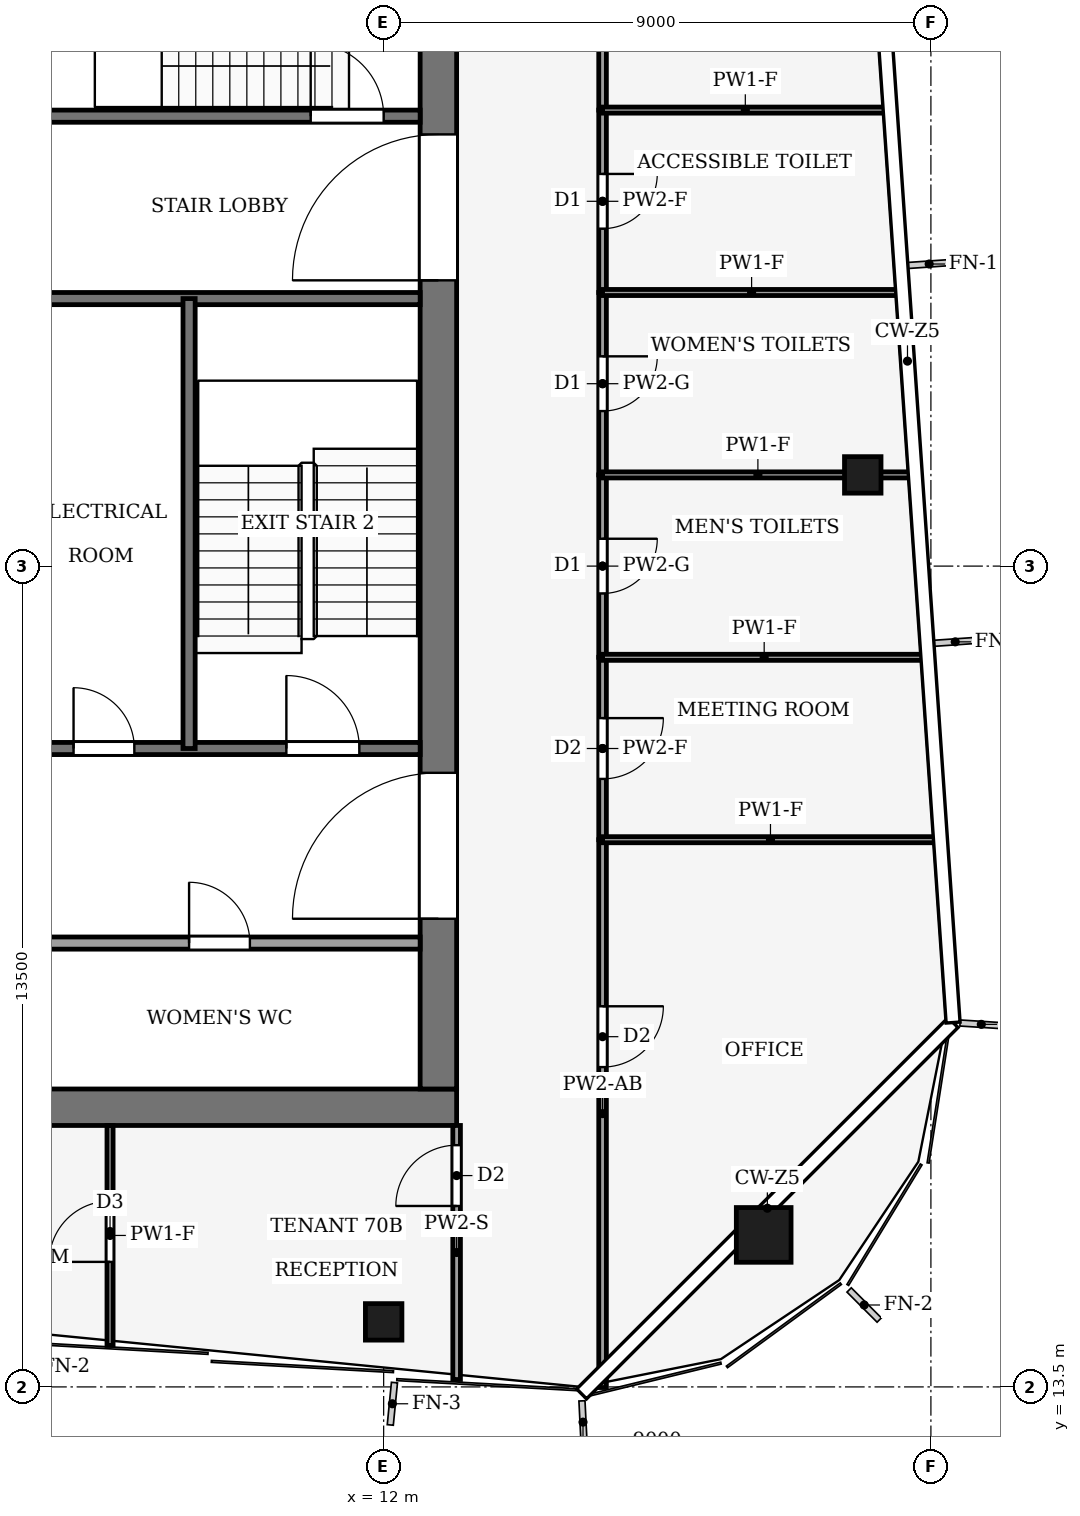
"""IFC4 building model, lengths in metres.
Left out: names, types, materials, properties, quantities, classifications, styles, units other than length and angle.
Written with IfcOpenShell. Run it as: python <this file> out.ifc"""

import sys

from ifc_helpers import new_model, si_unit, direction, frame, frame_2d, origin, origin_2d, place, context, subcontext, project, spatial, rectangle, hollow_rectangle, extrude, element, fill, save


model = new_model("IFC4")
c1 = context("Model", 3, precision=1e-05, world=origin(), true_north=direction((0.0, 1.0)))
c2 = subcontext(c1, "Body", "Model", "MODEL_VIEW")
j1 = project(units=[si_unit("LENGTHUNIT", "METRE"), si_unit("PLANEANGLEUNIT", "RADIAN")], contexts=[c1])
p1 = place(None, origin())
s1 = spatial("IfcSite", under=j1, at=p1, CompositionType="ELEMENT")
p2 = place(p1, origin())
s2 = spatial("IfcBuilding", under=s1, at=p2, CompositionType="ELEMENT")
p3 = place(p2, frame((0.0, 0.0, 306.0)))
s3 = spatial("IfcBuildingStorey", under=s2, at=p3, CompositionType="ELEMENT", Elevation=306.0)
p4 = place(p3, frame((-13.2, 18.1, -0.13), z_axis=(0.0, 0.0, 1.0), x_axis=(1.0, 0.0, 0.0)))
e1 = element("IfcWall", 1, at=p4, inside=s3, PredefinedType="SHEAR", context=c2, shape_type="SweptSolid", body=[
    extrude(rectangle(XDim=26.4, YDim=0.6, at=frame_2d((13.2, 0.0))), origin(), (0.0, 0.0, 1.0), 4.0),
])
p5 = place(p3, frame((12.9, 18.4, -0.13), z_axis=(0.0, 0.0, 1.0), x_axis=(0.0, 1.0, 0.0)))
e2 = element("IfcWall", 2, at=p5, inside=s3, PredefinedType="SHEAR", context=c2, shape_type="SweptSolid", body=[
    extrude(rectangle(XDim=19.2, YDim=0.6, at=frame_2d((9.6, 0.0))), origin(), (0.0, 0.0, 1.0), 4.0),
])
p6 = place(p5, frame((2.8, 0.0, 0.13)))
e3 = element("IfcOpeningElement", 3, at=p6, cuts=e2, PredefinedType="OPENING", context=c2, shape_type="SweptSolid", body=[
    extrude(rectangle(XDim=2.4, YDim=2.4, at=frame_2d((1.2, 1.2))), frame((0.0, 0.31, 0.0), z_axis=(0.0, -1.0, 0.0), x_axis=(1.0, 0.0, 0.0)), (0.0, 0.0, 1.0), 0.62),
])
p7 = place(p5, frame((13.3, 0.0, 0.13)))
e4 = element("IfcOpeningElement", 4, at=p7, cuts=e2, PredefinedType="OPENING", context=c2, shape_type="SweptSolid", body=[
    extrude(rectangle(XDim=2.4, YDim=2.4, at=frame_2d((1.2, 1.2))), frame((0.0, 0.31, 0.0), z_axis=(0.0, -1.0, 0.0), x_axis=(1.0, 0.0, 0.0)), (0.0, 0.0, 1.0), 0.62),
])
p8 = place(p3, frame((18.25, 16.0, 0.0), z_axis=(0.0, 0.0, 1.0), x_axis=(1.0, 0.0, 0.0)))
e5 = element("IfcColumn", 5, at=p8, inside=s3, PredefinedType="COLUMN", context=c2, shape_type="SweptSolid", body=[
    extrude(hollow_rectangle(XDim=0.9, YDim=0.9, WallThickness=0.04, at=origin_2d()), origin(), (0.0, 0.0, 1.0), 4.0),
])
for number, where, z_axis, x_axis in (
    (6, (12.0, 14.57, 0.0), (0.0, 0.0, 1.0), (1.0, 0.0, 0.0)),
    (7, (19.879, 28.5, 0.0), (0.0, 0.0, 1.0), (1.0, 0.0, 0.0)),
):
    element("IfcColumn", number, at=place(p3, frame(where, z_axis=z_axis, x_axis=x_axis)), inside=s3, PredefinedType="COLUMN", context=c2, shape_type="SweptSolid", body=[
        extrude(hollow_rectangle(XDim=0.6, YDim=0.6, WallThickness=0.025, at=origin_2d()), origin(), (0.0, 0.0, 1.0), 4.0),
    ])
p9 = place(p3, frame((6.0, 20.8, 0.0), z_axis=(0.0, 0.0, 1.0), x_axis=(1.0, 0.0, 0.0)))
e8 = element("IfcWall", 8, at=p9, inside=s3, PredefinedType="PARTITIONING", context=c2, shape_type="SweptSolid", body=[
    extrude(rectangle(XDim=6.6, YDim=0.2, at=frame_2d((3.3, 0.0))), origin(), (0.0, 0.0, 1.0), 3.87),
])
p10 = place(p9, frame((2.8, 0.0, 0.0)))
e9 = element("IfcOpeningElement", 9, at=p10, cuts=e8, PredefinedType="OPENING", context=c2, shape_type="SweptSolid", body=[
    extrude(rectangle(XDim=1.0, YDim=2.1, at=frame_2d((0.5, 1.05))), frame((0.0, 0.11, 0.0), z_axis=(0.0, -1.0, 0.0), x_axis=(1.0, 0.0, 0.0)), (0.0, 0.0, 1.0), 0.22),
])
p11 = place(p3, frame((6.0, 24.0, 0.0), z_axis=(0.0, 0.0, 1.0), x_axis=(1.0, 0.0, 0.0)))
e10 = element("IfcWall", 10, at=p11, inside=s3, PredefinedType="PARTITIONING", context=c2, shape_type="SweptSolid", body=[
    extrude(rectangle(XDim=6.6, YDim=0.2, at=frame_2d((3.3, 0.0))), origin(), (0.0, 0.0, 1.0), 3.87),
])
p12 = place(p11, frame((0.9, 0.0, 0.0)))
e11 = element("IfcOpeningElement", 11, at=p12, cuts=e10, PredefinedType="OPENING", context=c2, shape_type="SweptSolid", body=[
    extrude(rectangle(XDim=1.0, YDim=2.1, at=frame_2d((0.5, 1.05))), frame((0.0, 0.11, 0.0), z_axis=(0.0, -1.0, 0.0), x_axis=(1.0, 0.0, 0.0)), (0.0, 0.0, 1.0), 0.22),
])
p13 = place(p11, frame((4.4, 0.0, 0.0)))
e12 = element("IfcOpeningElement", 12, at=p13, cuts=e10, PredefinedType="OPENING", context=c2, shape_type="SweptSolid", body=[
    extrude(rectangle(XDim=1.2, YDim=2.2, at=frame_2d((0.6, 1.1))), frame((0.0, 0.11, 0.0), z_axis=(0.0, -1.0, 0.0), x_axis=(1.0, 0.0, 0.0)), (0.0, 0.0, 1.0), 0.22),
])
p14 = place(p3, frame((6.0, 31.4, 0.0), z_axis=(0.0, 0.0, 1.0), x_axis=(1.0, 0.0, 0.0)))
e13 = element("IfcWall", 13, at=p14, inside=s3, PredefinedType="PARTITIONING", context=c2, shape_type="SweptSolid", body=[
    extrude(rectangle(XDim=6.6, YDim=0.2, at=frame_2d((3.3, 0.0))), origin(), (0.0, 0.0, 1.0), 3.87),
])
p15 = place(p3, frame((6.0, 34.4, 0.0), z_axis=(0.0, 0.0, 1.0), x_axis=(1.0, 0.0, 0.0)))
e14 = element("IfcWall", 14, at=p15, inside=s3, PredefinedType="PARTITIONING", context=c2, shape_type="SweptSolid", body=[
    extrude(rectangle(XDim=6.6, YDim=0.2, at=frame_2d((3.3, 0.0))), origin(), (0.0, 0.0, 1.0), 3.87),
])
p16 = place(p15, frame((4.8, 0.0, 0.0)))
e15 = element("IfcOpeningElement", 15, at=p16, cuts=e14, PredefinedType="OPENING", context=c2, shape_type="SweptSolid", body=[
    extrude(rectangle(XDim=1.2, YDim=2.2, at=frame_2d((0.6, 1.1))), frame((0.0, 0.11, 0.0), z_axis=(0.0, -1.0, 0.0), x_axis=(1.0, 0.0, 0.0)), (0.0, 0.0, 1.0), 0.22),
])
p17 = place(p3, frame((8.8, 24.0, 0.0), z_axis=(0.0, 0.0, 1.0), x_axis=(0.0, 1.0, 0.0)))
e16 = element("IfcWall", 16, at=p17, inside=s3, PredefinedType="PARTITIONING", context=c2, shape_type="SweptSolid", body=[
    extrude(rectangle(XDim=7.4, YDim=0.2, at=frame_2d((3.7, 0.0))), origin(), (0.0, 0.0, 1.0), 3.87),
])
p18 = place(p3, frame((15.6, 22.5, 0.0), z_axis=(0.0, 0.0, 1.0), x_axis=(0.0, -1.0, 0.0)))
e17 = element("IfcWall", 17, at=p18, inside=s3, PredefinedType="PARTITIONING", context=c2, shape_type="SweptSolid", body=[
    extrude(rectangle(XDim=9.01, YDim=0.125, at=frame_2d((4.505, 0.0))), origin(), (0.0, 0.0, 1.0), 2.93),
])
p19 = place(p18, frame((2.74, 0.0, 0.0)))
e18 = element("IfcOpeningElement", 18, at=p19, cuts=e17, PredefinedType="OPENING", context=c2, shape_type="SweptSolid", body=[
    extrude(rectangle(XDim=1.0, YDim=2.1, at=frame_2d((0.5, 1.05))), frame((0.0, 0.073, 0.0), z_axis=(0.0, -1.0, 0.0), x_axis=(1.0, 0.0, 0.0)), (0.0, 0.0, 1.0), 0.145),
])
p20 = place(p3, frame((15.6, 25.5, 0.0), z_axis=(0.0, 0.0, 1.0), x_axis=(0.0, -1.0, 0.0)))
e19 = element("IfcWall", 19, at=p20, inside=s3, PredefinedType="PARTITIONING", context=c2, shape_type="SweptSolid", body=[
    extrude(rectangle(XDim=3.0, YDim=0.125, at=frame_2d((1.5, 0.0))), origin(), (0.0, 0.0, 1.0), 3.54),
])
p21 = place(p20, frame((1.0, 0.0, 0.0)))
e20 = element("IfcOpeningElement", 20, at=p21, cuts=e19, PredefinedType="OPENING", context=c2, shape_type="SweptSolid", body=[
    extrude(rectangle(XDim=1.0, YDim=2.1, at=frame_2d((0.5, 1.05))), frame((0.0, 0.073, 0.0), z_axis=(0.0, -1.0, 0.0), x_axis=(1.0, 0.0, 0.0)), (0.0, 0.0, 1.0), 0.145),
])
p22 = place(p3, frame((15.6, 28.5, 0.0), z_axis=(0.0, 0.0, 1.0), x_axis=(0.0, -1.0, 0.0)))
e21 = element("IfcWall", 21, at=p22, inside=s3, PredefinedType="PARTITIONING", context=c2, shape_type="SweptSolid", body=[
    extrude(rectangle(XDim=3.0, YDim=0.125, at=frame_2d((1.5, 0.0))), origin(), (0.0, 0.0, 1.0), 3.87),
])
p23 = place(p22, frame((1.05, 0.0, 0.0)))
e22 = element("IfcOpeningElement", 22, at=p23, cuts=e21, PredefinedType="OPENING", context=c2, shape_type="SweptSolid", body=[
    extrude(rectangle(XDim=0.9, YDim=2.1, at=frame_2d((0.45, 1.05))), frame((0.0, 0.073, 0.0), z_axis=(0.0, -1.0, 0.0), x_axis=(1.0, 0.0, 0.0)), (0.0, 0.0, 1.0), 0.145),
])
p24 = place(p3, frame((15.6, 31.5, 0.0), z_axis=(0.0, 0.0, 1.0), x_axis=(0.0, -1.0, 0.0)))
e23 = element("IfcWall", 23, at=p24, inside=s3, PredefinedType="PARTITIONING", context=c2, shape_type="SweptSolid", body=[
    extrude(rectangle(XDim=3.0, YDim=0.125, at=frame_2d((1.5, 0.0))), origin(), (0.0, 0.0, 1.0), 3.87),
])
p25 = place(p24, frame((1.05, 0.0, 0.0)))
e24 = element("IfcOpeningElement", 24, at=p25, cuts=e23, PredefinedType="OPENING", context=c2, shape_type="SweptSolid", body=[
    extrude(rectangle(XDim=0.9, YDim=2.1, at=frame_2d((0.45, 1.05))), frame((0.0, 0.073, 0.0), z_axis=(0.0, -1.0, 0.0), x_axis=(1.0, 0.0, 0.0)), (0.0, 0.0, 1.0), 0.145),
])
p26 = place(p3, frame((15.6, 34.5, 0.0), z_axis=(0.0, 0.0, 1.0), x_axis=(0.0, -1.0, 0.0)))
e25 = element("IfcWall", 25, at=p26, inside=s3, PredefinedType="PARTITIONING", context=c2, shape_type="SweptSolid", body=[
    extrude(rectangle(XDim=3.0, YDim=0.125, at=frame_2d((1.5, 0.0))), origin(), (0.0, 0.0, 1.0), 3.54),
])
p27 = place(p26, frame((1.05, 0.0, 0.0)))
e26 = element("IfcOpeningElement", 26, at=p27, cuts=e25, PredefinedType="OPENING", context=c2, shape_type="SweptSolid", body=[
    extrude(rectangle(XDim=0.9, YDim=2.1, at=frame_2d((0.45, 1.05))), frame((0.0, 0.073, 0.0), z_axis=(0.0, -1.0, 0.0), x_axis=(1.0, 0.0, 0.0)), (0.0, 0.0, 1.0), 0.145),
])
p28 = place(p3, frame((15.6, 40.604, 0.0), z_axis=(0.0, 0.0, 1.0), x_axis=(0.0, -1.0, 0.0)))
e27 = element("IfcWall", 27, at=p28, inside=s3, PredefinedType="PARTITIONING", context=c2, shape_type="SweptSolid", body=[
    extrude(rectangle(XDim=6.104, YDim=0.125, at=frame_2d((3.052, 0.0))), origin(), (0.0, 0.0, 1.0), 3.14),
])
p29 = place(p28, frame((2.552, 0.0, 0.0)))
e28 = element("IfcOpeningElement", 28, at=p29, cuts=e27, PredefinedType="OPENING", context=c2, shape_type="SweptSolid", body=[
    extrude(rectangle(XDim=1.0, YDim=2.1, at=frame_2d((0.5, 1.05))), frame((0.0, 0.073, 0.0), z_axis=(0.0, -1.0, 0.0), x_axis=(1.0, 0.0, 0.0)), (0.0, 0.0, 1.0), 0.145),
])
p30 = place(p3, frame((13.2, 13.622, 0.0), z_axis=(0.0, 0.0, 1.0), x_axis=(0.0, 1.0, 0.0)))
e29 = element("IfcWall", 29, at=p30, inside=s3, PredefinedType="PARTITIONING", context=c2, shape_type="SweptSolid", body=[
    extrude(rectangle(XDim=4.178, YDim=0.125, at=frame_2d((2.089, 0.0))), origin(), (0.0, 0.0, 1.0), 3.04),
])
p31 = place(p30, frame((2.854, 0.0, 0.0)))
e30 = element("IfcOpeningElement", 30, at=p31, cuts=e29, PredefinedType="OPENING", context=c2, shape_type="SweptSolid", body=[
    extrude(rectangle(XDim=1.0, YDim=2.1, at=frame_2d((0.5, 1.05))), frame((0.0, 0.073, 0.0), z_axis=(0.0, -1.0, 0.0), x_axis=(1.0, 0.0, 0.0)), (0.0, 0.0, 1.0), 0.145),
])
p32 = place(p3, frame((21.123, 22.5, 0.0), z_axis=(0.0, 0.0, 1.0), x_axis=(-1.0, 0.0, 0.0)))
e31 = element("IfcWall", 31, at=p32, inside=s3, PredefinedType="PARTITIONING", context=c2, shape_type="SweptSolid", body=[
    extrude(rectangle(XDim=5.523, YDim=0.1, at=frame_2d((2.761, 0.0))), origin(), (0.0, 0.0, 1.0), 3.04),
])
p33 = place(p3, frame((20.916, 25.5, 0.0), z_axis=(0.0, 0.0, 1.0), x_axis=(-1.0, 0.0, 0.0)))
e32 = element("IfcWall", 32, at=p33, inside=s3, PredefinedType="PARTITIONING", context=c2, shape_type="SweptSolid", body=[
    extrude(rectangle(XDim=5.316, YDim=0.1, at=frame_2d((2.658, 0.0))), origin(), (0.0, 0.0, 1.0), 3.04),
])
p34 = place(p3, frame((20.709, 28.5, 0.0), z_axis=(0.0, 0.0, 1.0), x_axis=(-1.0, 0.0, 0.0)))
e33 = element("IfcWall", 33, at=p34, inside=s3, PredefinedType="PARTITIONING", context=c2, shape_type="SweptSolid", body=[
    extrude(rectangle(XDim=5.109, YDim=0.1, at=frame_2d((2.555, 0.0))), origin(), (0.0, 0.0, 1.0), 3.04),
])
p35 = place(p3, frame((20.502, 31.5, 0.0), z_axis=(0.0, 0.0, 1.0), x_axis=(-1.0, 0.0, 0.0)))
e34 = element("IfcWall", 34, at=p35, inside=s3, PredefinedType="PARTITIONING", context=c2, shape_type="SweptSolid", body=[
    extrude(rectangle(XDim=4.902, YDim=0.1, at=frame_2d((2.451, 0.0))), origin(), (0.0, 0.0, 1.0), 3.04),
])
p36 = place(p3, frame((20.295, 34.5, 0.0), z_axis=(0.0, 0.0, 1.0), x_axis=(-1.0, 0.0, 0.0)))
e35 = element("IfcWall", 35, at=p36, inside=s3, PredefinedType="PARTITIONING", context=c2, shape_type="SweptSolid", body=[
    extrude(rectangle(XDim=4.695, YDim=0.1, at=frame_2d((2.348, 0.0))), origin(), (0.0, 0.0, 1.0), 3.04),
])
p37 = place(p3, frame((7.5, 14.182, 0.0), z_axis=(0.0, 0.0, 1.0), x_axis=(0.0, 1.0, 0.0)))
e36 = element("IfcWall", 36, at=p37, inside=s3, PredefinedType="PARTITIONING", context=c2, shape_type="SweptSolid", body=[
    extrude(rectangle(XDim=3.618, YDim=0.1, at=frame_2d((1.809, 0.0))), origin(), (0.0, 0.0, 1.0), 3.04),
])
p38 = place(p37, frame((1.374, 0.0, 0.0)))
e37 = element("IfcOpeningElement", 37, at=p38, cuts=e36, PredefinedType="OPENING", context=c2, shape_type="SweptSolid", body=[
    extrude(rectangle(XDim=1.0, YDim=2.1, at=frame_2d((0.5, 1.05))), frame((0.0, 0.06, 0.0), z_axis=(0.0, -1.0, 0.0), x_axis=(1.0, 0.0, 0.0)), (0.0, 0.0, 1.0), 0.12),
])
p39 = place(p10, origin())
e38 = element("IfcDoor", 38, at=p39, inside=s3, OperationType="SINGLE_SWING_RIGHT", PredefinedType="DOOR", context=c2, shape_type="SweptSolid", body=[
    extrude(rectangle(XDim=1.0, YDim=2.1, at=frame_2d((0.5, 1.05))), frame((0.0, 0.025, 0.0), z_axis=(0.0, -1.0, 0.0), x_axis=(1.0, 0.0, 0.0)), (0.0, 0.0, 1.0), 0.05),
])
fill(e9, e38)
p40 = place(p12, origin())
e39 = element("IfcDoor", 39, at=p40, inside=s3, OperationType="SINGLE_SWING_LEFT", PredefinedType="DOOR", context=c2, shape_type="SweptSolid", body=[
    extrude(rectangle(XDim=1.0, YDim=2.1, at=frame_2d((0.5, 1.05))), frame((0.0, 0.025, 0.0), z_axis=(0.0, -1.0, 0.0), x_axis=(1.0, 0.0, 0.0)), (0.0, 0.0, 1.0), 0.05),
])
fill(e11, e39)
p41 = place(p13, origin())
e40 = element("IfcDoor", 40, at=p41, inside=s3, OperationType="SINGLE_SWING_LEFT", PredefinedType="DOOR", context=c2, shape_type="SweptSolid", body=[
    extrude(rectangle(XDim=1.2, YDim=2.2, at=frame_2d((0.6, 1.1))), frame((0.0, 0.025, 0.0), z_axis=(0.0, -1.0, 0.0), x_axis=(1.0, 0.0, 0.0)), (0.0, 0.0, 1.0), 0.05),
])
fill(e12, e40)
p42 = place(p16, origin())
e41 = element("IfcDoor", 41, at=p42, inside=s3, OperationType="SINGLE_SWING_RIGHT", PredefinedType="DOOR", context=c2, shape_type="SweptSolid", body=[
    extrude(rectangle(XDim=1.2, YDim=2.2, at=frame_2d((0.6, 1.1))), frame((0.0, 0.025, 0.0), z_axis=(0.0, -1.0, 0.0), x_axis=(1.0, 0.0, 0.0)), (0.0, 0.0, 1.0), 0.05),
])
fill(e15, e41)
p43 = place(p6, origin())
e42 = element("IfcDoor", 42, at=p43, inside=s3, OperationType="DOUBLE_DOOR_SINGLE_SWING", PredefinedType="DOOR", context=c2, shape_type="SweptSolid", body=[
    extrude(rectangle(XDim=2.4, YDim=2.4, at=frame_2d((1.2, 1.2))), frame((0.0, 0.025, 0.0), z_axis=(0.0, -1.0, 0.0), x_axis=(1.0, 0.0, 0.0)), (0.0, 0.0, 1.0), 0.05),
])
fill(e3, e42)
p44 = place(p7, origin())
e43 = element("IfcDoor", 43, at=p44, inside=s3, OperationType="DOUBLE_DOOR_SINGLE_SWING", PredefinedType="DOOR", context=c2, shape_type="SweptSolid", body=[
    extrude(rectangle(XDim=2.4, YDim=2.4, at=frame_2d((1.2, 1.2))), frame((0.0, 0.025, 0.0), z_axis=(0.0, -1.0, 0.0), x_axis=(1.0, 0.0, 0.0)), (0.0, 0.0, 1.0), 0.05),
])
fill(e4, e43)
p45 = place(p19, origin())
e44 = element("IfcDoor", 44, at=p45, inside=s3, OperationType="SINGLE_SWING_LEFT", PredefinedType="DOOR", context=c2, shape_type="SweptSolid", body=[
    extrude(rectangle(XDim=1.0, YDim=2.1, at=frame_2d((0.5, 1.05))), frame((0.0, 0.025, 0.0), z_axis=(0.0, -1.0, 0.0), x_axis=(1.0, 0.0, 0.0)), (0.0, 0.0, 1.0), 0.05),
])
fill(e18, e44)
p46 = place(p21, origin())
e45 = element("IfcDoor", 45, at=p46, inside=s3, OperationType="SINGLE_SWING_LEFT", PredefinedType="DOOR", context=c2, shape_type="SweptSolid", body=[
    extrude(rectangle(XDim=1.0, YDim=2.1, at=frame_2d((0.5, 1.05))), frame((0.0, 0.025, 0.0), z_axis=(0.0, -1.0, 0.0), x_axis=(1.0, 0.0, 0.0)), (0.0, 0.0, 1.0), 0.05),
])
fill(e20, e45)
p47 = place(p23, origin())
e46 = element("IfcDoor", 46, at=p47, inside=s3, OperationType="SINGLE_SWING_RIGHT", PredefinedType="DOOR", context=c2, shape_type="SweptSolid", body=[
    extrude(rectangle(XDim=0.9, YDim=2.1, at=frame_2d((0.45, 1.05))), frame((0.0, 0.025, 0.0), z_axis=(0.0, -1.0, 0.0), x_axis=(1.0, 0.0, 0.0)), (0.0, 0.0, 1.0), 0.05),
])
fill(e22, e46)
p48 = place(p25, origin())
e47 = element("IfcDoor", 47, at=p48, inside=s3, OperationType="SINGLE_SWING_LEFT", PredefinedType="DOOR", context=c2, shape_type="SweptSolid", body=[
    extrude(rectangle(XDim=0.9, YDim=2.1, at=frame_2d((0.45, 1.05))), frame((0.0, 0.025, 0.0), z_axis=(0.0, -1.0, 0.0), x_axis=(1.0, 0.0, 0.0)), (0.0, 0.0, 1.0), 0.05),
])
fill(e24, e47)
p49 = place(p27, origin())
e48 = element("IfcDoor", 48, at=p49, inside=s3, OperationType="SINGLE_SWING_RIGHT", PredefinedType="DOOR", context=c2, shape_type="SweptSolid", body=[
    extrude(rectangle(XDim=0.9, YDim=2.1, at=frame_2d((0.45, 1.05))), frame((0.0, 0.025, 0.0), z_axis=(0.0, -1.0, 0.0), x_axis=(1.0, 0.0, 0.0)), (0.0, 0.0, 1.0), 0.05),
])
fill(e26, e48)
p50 = place(p31, origin())
e49 = element("IfcDoor", 49, at=p50, inside=s3, OperationType="SINGLE_SWING_RIGHT", PredefinedType="DOOR", context=c2, shape_type="SweptSolid", body=[
    extrude(rectangle(XDim=1.0, YDim=2.1, at=frame_2d((0.5, 1.05))), frame((0.0, 0.025, 0.0), z_axis=(0.0, -1.0, 0.0), x_axis=(1.0, 0.0, 0.0)), (0.0, 0.0, 1.0), 0.05),
])
fill(e30, e49)
p51 = place(p38, origin())
e50 = element("IfcDoor", 50, at=p51, inside=s3, OperationType="SINGLE_SWING_RIGHT", PredefinedType="DOOR", context=c2, shape_type="SweptSolid", body=[
    extrude(rectangle(XDim=1.0, YDim=2.1, at=frame_2d((0.5, 1.05))), frame((0.0, 0.025, 0.0), z_axis=(0.0, -1.0, 0.0), x_axis=(1.0, 0.0, 0.0)), (0.0, 0.0, 1.0), 0.05),
])
fill(e37, e50)
save(model, sys.argv[1])
